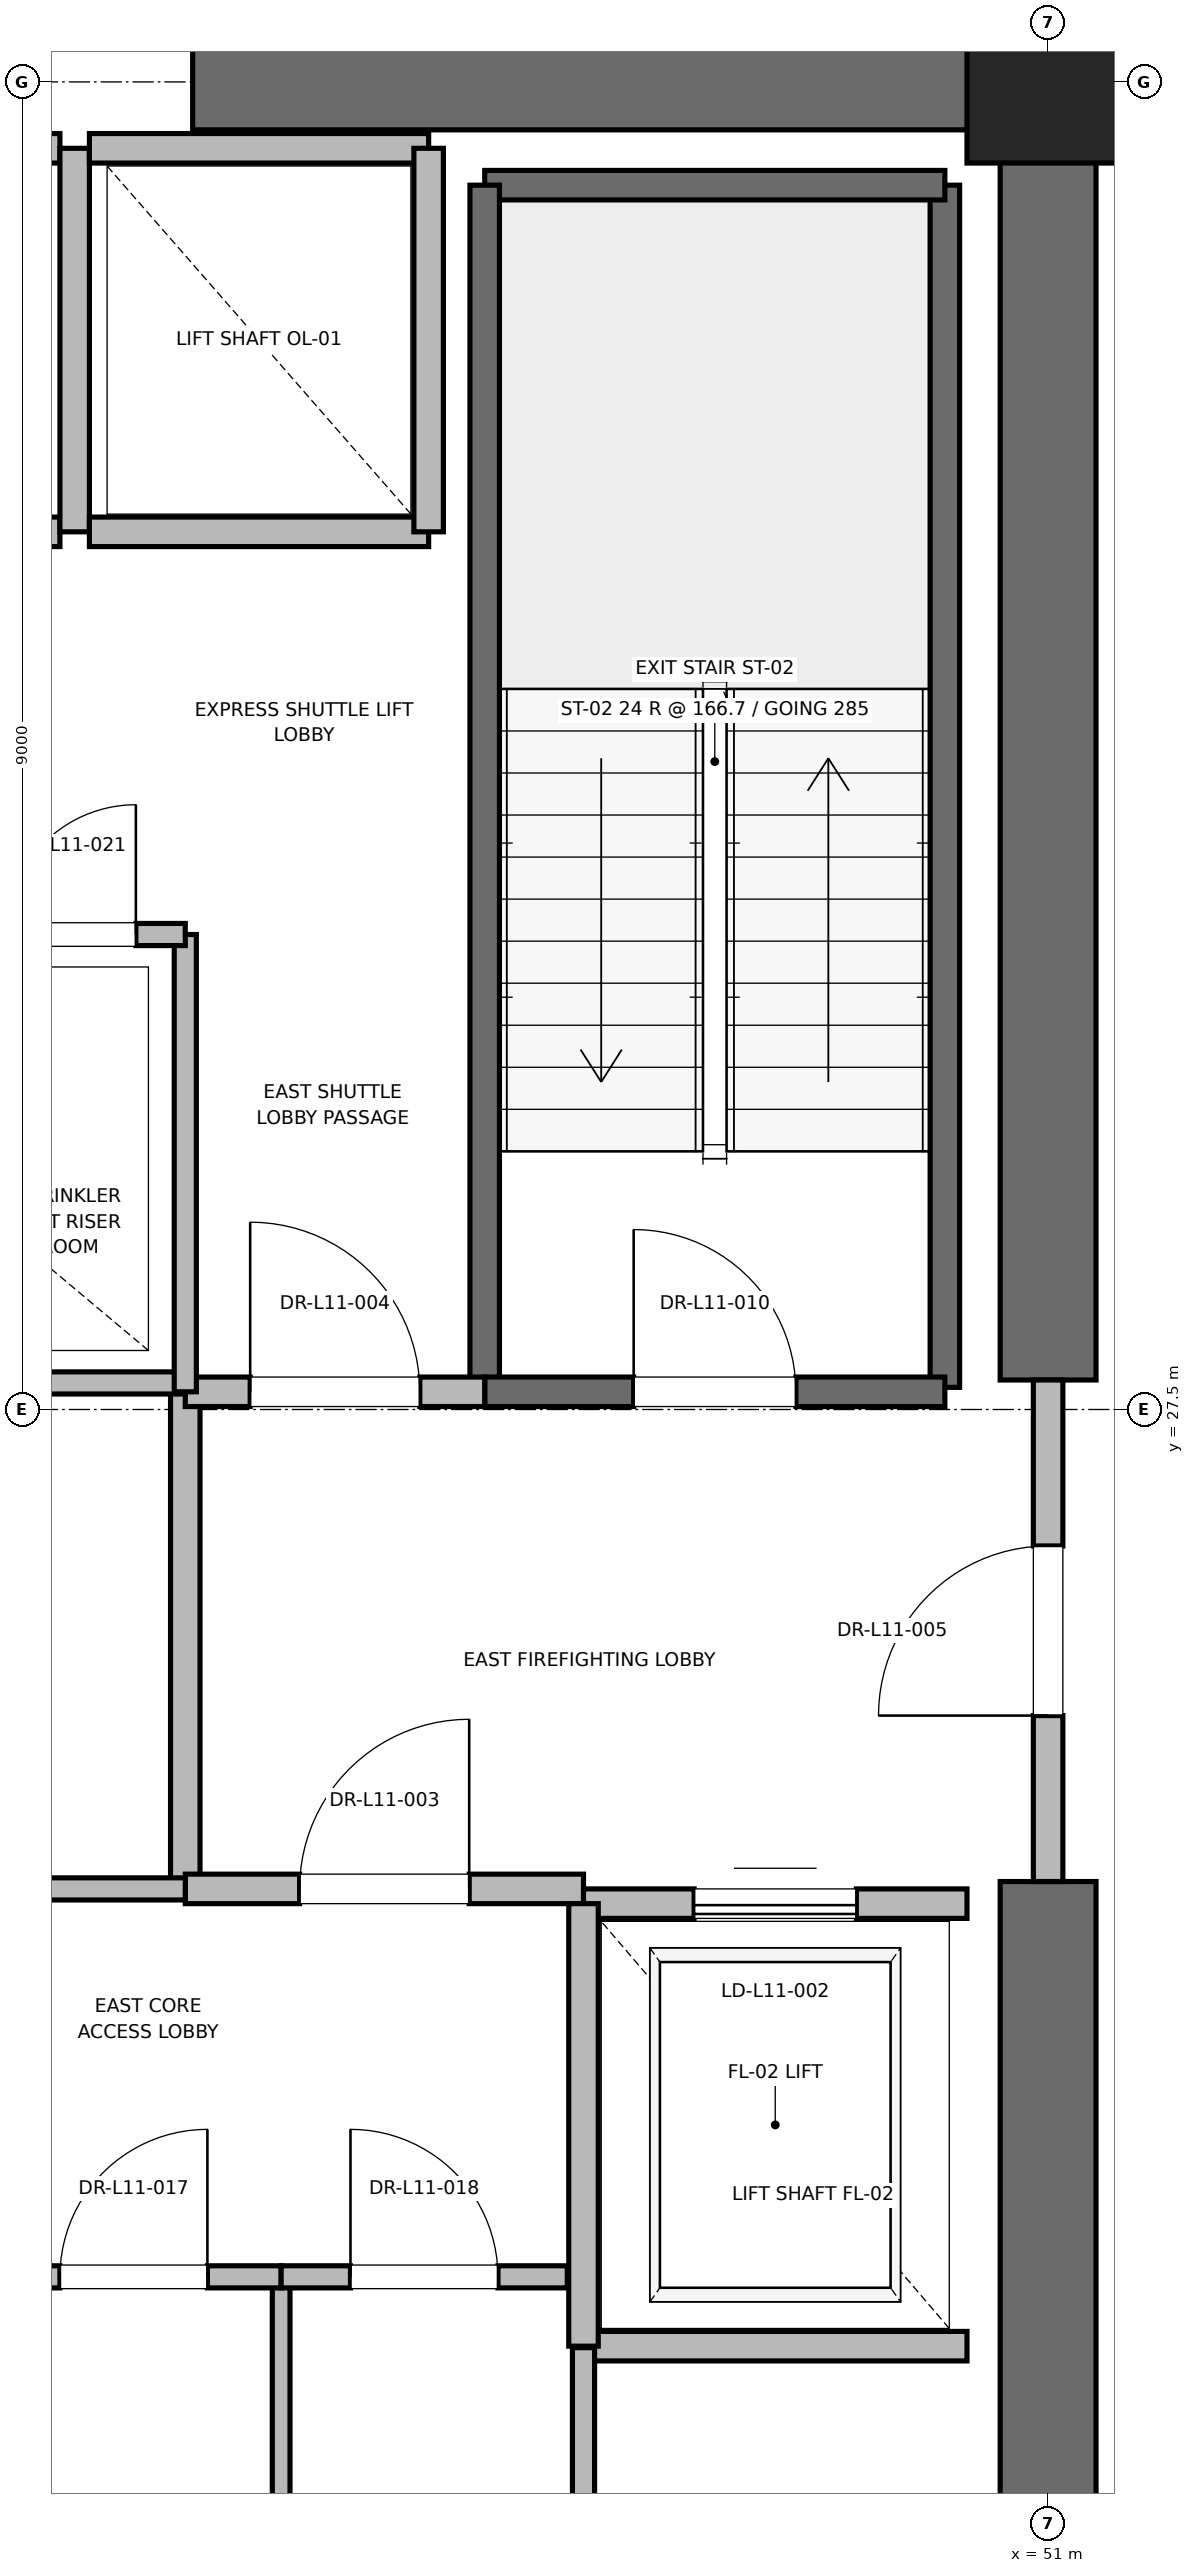
"""IFC4 building model, lengths in metres.
Left out: names, types, materials, properties, quantities, classifications, styles, units other than length and angle.
Written with IfcOpenShell. Run it as: python <this file> out.ifc"""

import sys

from ifc_helpers import new_model, si_unit, direction, frame, frame_2d, origin, origin_2d, place, context, subcontext, project, spatial, rectangle, extrude, element, fill, save


model = new_model("IFC4")
c1 = context("Model", 3, precision=1e-05, world=origin(), true_north=direction((0.0, 1.0)))
c2 = subcontext(c1, "Body", "Model", "MODEL_VIEW")
j1 = project(units=[si_unit("LENGTHUNIT", "METRE"), si_unit("PLANEANGLEUNIT", "RADIAN")], contexts=[c1])
p1 = place(None, origin())
s1 = spatial("IfcSite", under=j1, at=p1, CompositionType="ELEMENT")
p2 = place(p1, origin())
s2 = spatial("IfcBuilding", under=s1, at=p2, CompositionType="ELEMENT")
p3 = place(p2, frame((0.0, 0.0, 51.6)))
s3 = spatial("IfcBuildingStorey", under=s2, at=p3, CompositionType="ELEMENT", Elevation=51.6)
p4 = place(p3, frame((51.0, 36.5, 0.0), z_axis=(0.0, 0.0, 1.0), x_axis=(1.0, 0.0, 0.0)))
e1 = element("IfcColumn", 1, at=p4, inside=s3, PredefinedType="PILASTER", context=c2, shape_type="SweptSolid", body=[
    extrude(rectangle(XDim=1.1, YDim=1.1, at=origin_2d()), origin(), (0.0, 0.0, 1.0), 4.0),
])
for number, where, z_axis, x_axis in (
    (2, (45.2, 36.5, 0.0), (0.0, 0.0, 1.0), (1.0, 0.0, 0.0)),
    (3, (51.0, 18.5, 0.0), (0.0, 0.0, 1.0), (0.0, 1.0, 0.0)),
):
    element("IfcWall", number, at=place(p3, frame(where, z_axis=z_axis, x_axis=x_axis)), inside=s3, PredefinedType="SHEAR", context=c2, shape_type="SweptSolid", body=[
        extrude(rectangle(XDim=5.8, YDim=0.65, at=frame_2d((2.9, 0.0))), origin(), (0.0, 0.0, 1.0), 3.76),
    ])
p5 = place(p3, frame((51.0, 27.7, 0.0), z_axis=(0.0, 0.0, 1.0), x_axis=(0.0, 1.0, 0.0)))
e4 = element("IfcWall", 4, at=p5, inside=s3, PredefinedType="SHEAR", context=c2, shape_type="SweptSolid", body=[
    extrude(rectangle(XDim=8.8, YDim=0.65, at=frame_2d((4.4, 0.0))), origin(), (0.0, 0.0, 1.0), 3.76),
])
p6 = place(p3, frame((50.3, 27.65, 0.0), z_axis=(0.0, 0.0, 1.0), x_axis=(0.0, 1.0, 0.0)))
e5 = element("IfcWall", 5, at=p6, inside=s3, PredefinedType="SOLIDWALL", context=c2, shape_type="SweptSolid", body=[
    extrude(rectangle(XDim=8.15, YDim=0.2, at=frame_2d((4.075, 0.0))), origin(), (0.0, 0.0, 1.0), 3.76),
])
p7 = place(p3, frame((47.18, 35.8, 0.0), z_axis=(0.0, 0.0, 1.0), x_axis=(1.0, 0.0, 0.0)))
e6 = element("IfcWall", 6, at=p7, inside=s3, PredefinedType="SOLIDWALL", context=c2, shape_type="SweptSolid", body=[
    extrude(rectangle(XDim=3.12, YDim=0.2, at=frame_2d((1.56, 0.0))), origin(), (0.0, 0.0, 1.0), 3.76),
])
p8 = place(p3, frame((47.18, 27.62, 0.0), z_axis=(0.0, 0.0, 1.0), x_axis=(0.0, 1.0, 0.0)))
e7 = element("IfcWall", 7, at=p8, inside=s3, PredefinedType="SOLIDWALL", context=c2, shape_type="SweptSolid", body=[
    extrude(rectangle(XDim=8.18, YDim=0.2, at=frame_2d((4.09, 0.0))), origin(), (0.0, 0.0, 1.0), 3.76),
])
p9 = place(p3, frame((47.18, 27.62, 0.0), z_axis=(0.0, 0.0, 1.0), x_axis=(1.0, 0.0, 0.0)))
e8 = element("IfcWall", 8, at=p9, inside=s3, PredefinedType="SOLIDWALL", context=c2, shape_type="SweptSolid", body=[
    extrude(rectangle(XDim=3.12, YDim=0.2, at=frame_2d((1.56, 0.0))), origin(), (0.0, 0.0, 1.0), 3.76),
])
p10 = place(p9, frame((1.01, 0.0, 0.0)))
e9 = element("IfcOpeningElement", 9, at=p10, cuts=e8, PredefinedType="OPENING", context=c2, shape_type="SweptSolid", body=[
    extrude(rectangle(XDim=1.1, YDim=2.15, at=frame_2d((0.55, 1.075))), frame((0.0, 0.1, 0.0), z_axis=(0.0, -1.0, 0.0), x_axis=(1.0, 0.0, 0.0)), (0.0, 0.0, 1.0), 0.2),
])
p11 = place(p3, frame((45.15, 24.25, 0.0), z_axis=(0.0, 0.0, 1.0), x_axis=(0.0, 1.0, 0.0)))
e10 = element("IfcWall", 10, at=p11, inside=s3, PredefinedType="PARTITIONING", context=c2, shape_type="SweptSolid", body=[
    extrude(rectangle(XDim=3.37, YDim=0.2, at=frame_2d((1.685, 0.0))), origin(), (0.0, 0.0, 1.0), 3.76),
])
p12 = place(p3, frame((45.15, 24.25, 0.0), z_axis=(0.0, 0.0, 1.0), x_axis=(1.0, 0.0, 0.0)))
e11 = element("IfcWall", 11, at=p12, inside=s3, PredefinedType="PARTITIONING", context=c2, shape_type="SweptSolid", body=[
    extrude(rectangle(XDim=2.7, YDim=0.2, at=frame_2d((1.35, 0.0))), origin(), (0.0, 0.0, 1.0), 3.76),
])
p13 = place(p12, frame((0.775, 0.0, 0.0)))
e12 = element("IfcOpeningElement", 12, at=p13, cuts=e11, PredefinedType="OPENING", context=c2, shape_type="SweptSolid", body=[
    extrude(rectangle(XDim=1.15, YDim=2.2, at=frame_2d((0.575, 1.1))), frame((0.0, 0.1, 0.0), z_axis=(0.0, -1.0, 0.0), x_axis=(1.0, 0.0, 0.0)), (0.0, 0.0, 1.0), 0.2),
])
p14 = place(p3, frame((45.15, 27.62, 0.0), z_axis=(0.0, 0.0, 1.0), x_axis=(1.0, 0.0, 0.0)))
e13 = element("IfcWall", 13, at=p14, inside=s3, PredefinedType="PARTITIONING", context=c2, shape_type="SweptSolid", body=[
    extrude(rectangle(XDim=2.03, YDim=0.2, at=frame_2d((1.015, 0.0))), origin(), (0.0, 0.0, 1.0), 3.76),
])
p15 = place(p14, frame((0.44, 0.0, 0.0)))
e14 = element("IfcOpeningElement", 14, at=p15, cuts=e13, PredefinedType="OPENING", context=c2, shape_type="SweptSolid", body=[
    extrude(rectangle(XDim=1.15, YDim=2.2, at=frame_2d((0.575, 1.1))), frame((0.0, 0.1, 0.0), z_axis=(0.0, -1.0, 0.0), x_axis=(1.0, 0.0, 0.0)), (0.0, 0.0, 1.0), 0.2),
])
p16 = place(p3, frame((51.0, 24.3, 0.0), z_axis=(0.0, 0.0, 1.0), x_axis=(0.0, 1.0, 0.0)))
e15 = element("IfcWall", 15, at=p16, inside=s3, PredefinedType="PARTITIONING", context=c2, shape_type="SweptSolid", body=[
    extrude(rectangle(XDim=3.4, YDim=0.2, at=frame_2d((1.7, 0.0))), origin(), (0.0, 0.0, 1.0), 2.54),
])
p17 = place(p16, frame((1.125, 0.0, 0.0)))
e16 = element("IfcOpeningElement", 16, at=p17, cuts=e15, PredefinedType="OPENING", context=c2, shape_type="SweptSolid", body=[
    extrude(rectangle(XDim=1.15, YDim=2.2, at=frame_2d((0.575, 1.1))), frame((0.0, 0.1, 0.0), z_axis=(0.0, -1.0, 0.0), x_axis=(1.0, 0.0, 0.0)), (0.0, 0.0, 1.0), 0.2),
])
p18 = place(p3, frame((47.85, 21.15, 0.0), z_axis=(0.0, 0.0, 1.0), x_axis=(1.0, 0.0, 0.0)))
e17 = element("IfcWall", 17, at=p18, inside=s3, PredefinedType="SOLIDWALL", context=c2, shape_type="SweptSolid", body=[
    extrude(rectangle(XDim=2.6, YDim=0.2, at=frame_2d((1.3, 0.0))), origin(), (0.0, 0.0, 1.0), 3.76),
])
p19 = place(p3, frame((50.45, 24.15, 0.0), z_axis=(0.0, 0.0, 1.0), x_axis=(-1.0, 0.0, 0.0)))
e18 = element("IfcWall", 18, at=p19, inside=s3, PredefinedType="SOLIDWALL", context=c2, shape_type="SweptSolid", body=[
    extrude(rectangle(XDim=2.6, YDim=0.2, at=frame_2d((1.3, 0.0))), origin(), (0.0, 0.0, 1.0), 2.54),
])
p20 = place(p19, frame((0.75, 0.0, 0.0)))
e19 = element("IfcOpeningElement", 19, at=p20, cuts=e18, PredefinedType="OPENING", context=c2, shape_type="SweptSolid", body=[
    extrude(rectangle(XDim=1.1, YDim=2.2, at=frame_2d((0.55, 1.1))), frame((0.0, 0.1, 0.0), z_axis=(0.0, -1.0, 0.0), x_axis=(1.0, 0.0, 0.0)), (0.0, 0.0, 1.0), 0.2),
])
p21 = place(p3, frame((47.85, 24.15, 0.0), z_axis=(0.0, 0.0, 1.0), x_axis=(0.0, -1.0, 0.0)))
e20 = element("IfcWall", 20, at=p21, inside=s3, PredefinedType="SOLIDWALL", context=c2, shape_type="SweptSolid", body=[
    extrude(rectangle(XDim=3.0, YDim=0.2, at=frame_2d((1.5, 0.0))), origin(), (0.0, 0.0, 1.0), 3.76),
])
p22 = place(p3, frame((42.0, 33.45, 0.0), z_axis=(0.0, 0.0, 1.0), x_axis=(1.0, 0.0, 0.0)))
e21 = element("IfcWall", 21, at=p22, inside=s3, PredefinedType="SOLIDWALL", context=c2, shape_type="SweptSolid", body=[
    extrude(rectangle(XDim=2.3, YDim=0.2, at=frame_2d((1.15, 0.0))), origin(), (0.0, 0.0, 1.0), 3.76),
])
p23 = place(p3, frame((44.3, 36.05, 0.0), z_axis=(0.0, 0.0, 1.0), x_axis=(-1.0, 0.0, 0.0)))
e22 = element("IfcWall", 22, at=p23, inside=s3, PredefinedType="SOLIDWALL", context=c2, shape_type="SweptSolid", body=[
    extrude(rectangle(XDim=2.3, YDim=0.2, at=frame_2d((1.15, 0.0))), origin(), (0.0, 0.0, 1.0), 2.54),
])
p24 = place(p3, frame((44.4, 33.45, 0.0), z_axis=(0.0, 0.0, 1.0), x_axis=(0.0, 1.0, 0.0)))
e23 = element("IfcWall", 23, at=p24, inside=s3, PredefinedType="SOLIDWALL", context=c2, shape_type="SweptSolid", body=[
    extrude(rectangle(XDim=2.6, YDim=0.2, at=frame_2d((1.3, 0.0))), origin(), (0.0, 0.0, 1.0), 2.54),
])
p25 = place(p3, frame((44.5, 33.45, 0.0), z_axis=(0.0, 0.0, 1.0), x_axis=(1.0, 0.0, 0.0)))
e24 = element("IfcWall", 24, at=p25, inside=s3, PredefinedType="SOLIDWALL", context=c2, shape_type="SweptSolid", body=[
    extrude(rectangle(XDim=2.3, YDim=0.2, at=frame_2d((1.15, 0.0))), origin(), (0.0, 0.0, 1.0), 3.76),
])
p26 = place(p3, frame((46.8, 36.05, 0.0), z_axis=(0.0, 0.0, 1.0), x_axis=(-1.0, 0.0, 0.0)))
e25 = element("IfcWall", 25, at=p26, inside=s3, PredefinedType="SOLIDWALL", context=c2, shape_type="SweptSolid", body=[
    extrude(rectangle(XDim=2.3, YDim=0.2, at=frame_2d((1.15, 0.0))), origin(), (0.0, 0.0, 1.0), 2.54),
])
p27 = place(p3, frame((46.8, 33.45, 0.0), z_axis=(0.0, 0.0, 1.0), x_axis=(0.0, 1.0, 0.0)))
e26 = element("IfcWall", 26, at=p27, inside=s3, PredefinedType="SOLIDWALL", context=c2, shape_type="SweptSolid", body=[
    extrude(rectangle(XDim=2.6, YDim=0.2, at=frame_2d((1.3, 0.0))), origin(), (0.0, 0.0, 1.0), 3.76),
])
p28 = place(p3, frame((41.56, 27.68, 0.0), z_axis=(0.0, 0.0, 1.0), x_axis=(1.0, 0.0, 0.0)))
e27 = element("IfcWall", 27, at=p28, inside=s3, PredefinedType="PARTITIONING", context=c2, shape_type="SweptSolid", body=[
    extrude(rectangle(XDim=3.59, YDim=0.15, at=frame_2d((1.795, 0.0))), origin(), (0.0, 0.0, 1.0), 2.85),
])
p29 = place(p3, frame((47.85, 18.6, 0.0), z_axis=(0.0, 0.0, 1.0), x_axis=(0.0, 1.0, 0.0)))
e28 = element("IfcWall", 28, at=p29, inside=s3, PredefinedType="PARTITIONING", context=c2, shape_type="SweptSolid", body=[
    extrude(rectangle(XDim=2.54, YDim=0.15, at=frame_2d((1.27, 0.0))), origin(), (0.0, 0.0, 1.0), 2.85),
])
p30 = place(p3, frame((45.8, 18.6, 0.0), z_axis=(0.0, 0.0, 1.0), x_axis=(0.0, 1.0, 0.0)))
e29 = element("IfcWall", 29, at=p30, inside=s3, PredefinedType="PARTITIONING", context=c2, shape_type="SweptSolid", body=[
    extrude(rectangle(XDim=3.02, YDim=0.12, at=frame_2d((1.51, 0.0))), origin(), (0.0, 0.0, 1.0), 2.85),
])
p31 = place(p3, frame((43.8, 21.62, 0.0), z_axis=(0.0, 0.0, 1.0), x_axis=(1.0, 0.0, 0.0)))
e30 = element("IfcWall", 30, at=p31, inside=s3, PredefinedType="PARTITIONING", context=c2, shape_type="SweptSolid", body=[
    extrude(rectangle(XDim=2.0, YDim=0.15, at=frame_2d((1.0, 0.0))), origin(), (0.0, 0.0, 1.0), 2.85),
])
p32 = place(p31, frame((0.5, 0.0, 0.0)))
e31 = element("IfcOpeningElement", 31, at=p32, cuts=e30, PredefinedType="OPENING", context=c2, shape_type="SweptSolid", body=[
    extrude(rectangle(XDim=1.0, YDim=2.15, at=frame_2d((0.5, 1.075))), frame((0.0, 0.075, 0.0), z_axis=(0.0, -1.0, 0.0), x_axis=(1.0, 0.0, 0.0)), (0.0, 0.0, 1.0), 0.15),
])
p33 = place(p3, frame((45.8, 21.62, 0.0), z_axis=(0.0, 0.0, 1.0), x_axis=(1.0, 0.0, 0.0)))
e32 = element("IfcWall", 32, at=p33, inside=s3, PredefinedType="PARTITIONING", context=c2, shape_type="SweptSolid", body=[
    extrude(rectangle(XDim=1.94, YDim=0.15, at=frame_2d((0.97, 0.0))), origin(), (0.0, 0.0, 1.0), 2.85),
])
p34 = place(p33, frame((0.47, 0.0, 0.0)))
e33 = element("IfcOpeningElement", 33, at=p34, cuts=e32, PredefinedType="OPENING", context=c2, shape_type="SweptSolid", body=[
    extrude(rectangle(XDim=1.0, YDim=2.15, at=frame_2d((0.5, 1.075))), frame((0.0, 0.075, 0.0), z_axis=(0.0, -1.0, 0.0), x_axis=(1.0, 0.0, 0.0)), (0.0, 0.0, 1.0), 0.15),
])
p35 = place(p3, frame((41.76, 24.25, 0.0), z_axis=(0.0, 0.0, 1.0), x_axis=(1.0, 0.0, 0.0)))
e34 = element("IfcWall", 34, at=p35, inside=s3, PredefinedType="PARTITIONING", context=c2, shape_type="SweptSolid", body=[
    extrude(rectangle(XDim=3.39, YDim=0.15, at=frame_2d((1.695, 0.0))), origin(), (0.0, 0.0, 1.0), 2.85),
])
p36 = place(p35, frame((1.255, 0.0, 0.0)))
e35 = element("IfcOpeningElement", 35, at=p36, cuts=e34, PredefinedType="OPENING", context=c2, shape_type="SweptSolid", body=[
    extrude(rectangle(XDim=0.88, YDim=2.1, at=frame_2d((0.44, 1.05))), frame((0.0, 0.075, 0.0), z_axis=(0.0, -1.0, 0.0), x_axis=(1.0, 0.0, 0.0)), (0.0, 0.0, 1.0), 0.15),
])
p37 = place(p3, frame((45.15, 27.62, 0.0), z_axis=(0.0, 0.0, 1.0), x_axis=(0.0, 1.0, 0.0)))
e36 = element("IfcWall", 36, at=p37, inside=s3, PredefinedType="PARTITIONING", context=c2, shape_type="SweptSolid", body=[
    extrude(rectangle(XDim=3.1, YDim=0.15, at=frame_2d((1.55, 0.0))), origin(), (0.0, 0.0, 1.0), 2.85),
])
p38 = place(p3, frame((43.6, 30.72, 0.0), z_axis=(0.0, 0.0, 1.0), x_axis=(1.0, 0.0, 0.0)))
e37 = element("IfcWall", 37, at=p38, inside=s3, PredefinedType="PARTITIONING", context=c2, shape_type="SweptSolid", body=[
    extrude(rectangle(XDim=1.55, YDim=0.15, at=frame_2d((0.775, 0.0))), origin(), (0.0, 0.0, 1.0), 2.85),
])
p39 = place(p38, frame((0.335, 0.0, 0.0)))
e38 = element("IfcOpeningElement", 38, at=p39, cuts=e37, PredefinedType="OPENING", context=c2, shape_type="SweptSolid", body=[
    extrude(rectangle(XDim=0.88, YDim=2.1, at=frame_2d((0.44, 1.05))), frame((0.0, 0.075, 0.0), z_axis=(0.0, -1.0, 0.0), x_axis=(1.0, 0.0, 0.0)), (0.0, 0.0, 1.0), 0.15),
])
p40 = place(p10, origin())
e39 = element("IfcDoor", 39, at=p40, inside=s3, OperationType="SINGLE_SWING_LEFT", PredefinedType="DOOR", context=c2, shape_type="SweptSolid", body=[
    extrude(rectangle(XDim=1.1, YDim=2.15, at=frame_2d((0.55, 1.075))), frame((0.0, 0.025, 0.0), z_axis=(0.0, -1.0, 0.0), x_axis=(1.0, 0.0, 0.0)), (0.0, 0.0, 1.0), 0.05),
])
fill(e9, e39)
p41 = place(p13, origin())
e40 = element("IfcDoor", 40, at=p41, inside=s3, OperationType="SINGLE_SWING_RIGHT", PredefinedType="DOOR", context=c2, shape_type="SweptSolid", body=[
    extrude(rectangle(XDim=1.15, YDim=2.2, at=frame_2d((0.575, 1.1))), frame((0.0, 0.025, 0.0), z_axis=(0.0, -1.0, 0.0), x_axis=(1.0, 0.0, 0.0)), (0.0, 0.0, 1.0), 0.05),
])
fill(e12, e40)
p42 = place(p15, origin())
e41 = element("IfcDoor", 41, at=p42, inside=s3, OperationType="SINGLE_SWING_LEFT", PredefinedType="DOOR", context=c2, shape_type="SweptSolid", body=[
    extrude(rectangle(XDim=1.15, YDim=2.2, at=frame_2d((0.575, 1.1))), frame((0.0, 0.025, 0.0), z_axis=(0.0, -1.0, 0.0), x_axis=(1.0, 0.0, 0.0)), (0.0, 0.0, 1.0), 0.05),
])
fill(e14, e41)
p43 = place(p17, origin())
e42 = element("IfcDoor", 42, at=p43, inside=s3, OperationType="SINGLE_SWING_LEFT", PredefinedType="DOOR", context=c2, shape_type="SweptSolid", body=[
    extrude(rectangle(XDim=1.15, YDim=2.2, at=frame_2d((0.575, 1.1))), frame((0.0, 0.025, 0.0), z_axis=(0.0, -1.0, 0.0), x_axis=(1.0, 0.0, 0.0)), (0.0, 0.0, 1.0), 0.05),
])
fill(e16, e42)
p44 = place(p20, origin())
e43 = element("IfcDoor", 43, at=p44, inside=s3, OperationType="SLIDING_TO_RIGHT", PredefinedType="DOOR", context=c2, shape_type="SweptSolid", body=[
    extrude(rectangle(XDim=1.1, YDim=2.2, at=frame_2d((0.55, 1.1))), frame((0.0, 0.025, 0.0), z_axis=(0.0, -1.0, 0.0), x_axis=(1.0, 0.0, 0.0)), (0.0, 0.0, 1.0), 0.05),
])
fill(e19, e43)
p45 = place(p32, origin())
e44 = element("IfcDoor", 44, at=p45, inside=s3, OperationType="SINGLE_SWING_RIGHT", PredefinedType="DOOR", context=c2, shape_type="SweptSolid", body=[
    extrude(rectangle(XDim=1.0, YDim=2.15, at=frame_2d((0.5, 1.075))), frame((0.0, 0.025, 0.0), z_axis=(0.0, -1.0, 0.0), x_axis=(1.0, 0.0, 0.0)), (0.0, 0.0, 1.0), 0.05),
])
fill(e31, e44)
p46 = place(p34, origin())
e45 = element("IfcDoor", 45, at=p46, inside=s3, OperationType="SINGLE_SWING_LEFT", PredefinedType="DOOR", context=c2, shape_type="SweptSolid", body=[
    extrude(rectangle(XDim=1.0, YDim=2.15, at=frame_2d((0.5, 1.075))), frame((0.0, 0.025, 0.0), z_axis=(0.0, -1.0, 0.0), x_axis=(1.0, 0.0, 0.0)), (0.0, 0.0, 1.0), 0.05),
])
fill(e33, e45)
p47 = place(p39, origin())
e46 = element("IfcDoor", 46, at=p47, inside=s3, OperationType="SINGLE_SWING_RIGHT", PredefinedType="DOOR", context=c2, shape_type="SweptSolid", body=[
    extrude(rectangle(XDim=0.88, YDim=2.1, at=frame_2d((0.44, 1.05))), frame((0.0, 0.025, 0.0), z_axis=(0.0, -1.0, 0.0), x_axis=(1.0, 0.0, 0.0)), (0.0, 0.0, 1.0), 0.05),
])
fill(e38, e46)
save(model, sys.argv[1])
